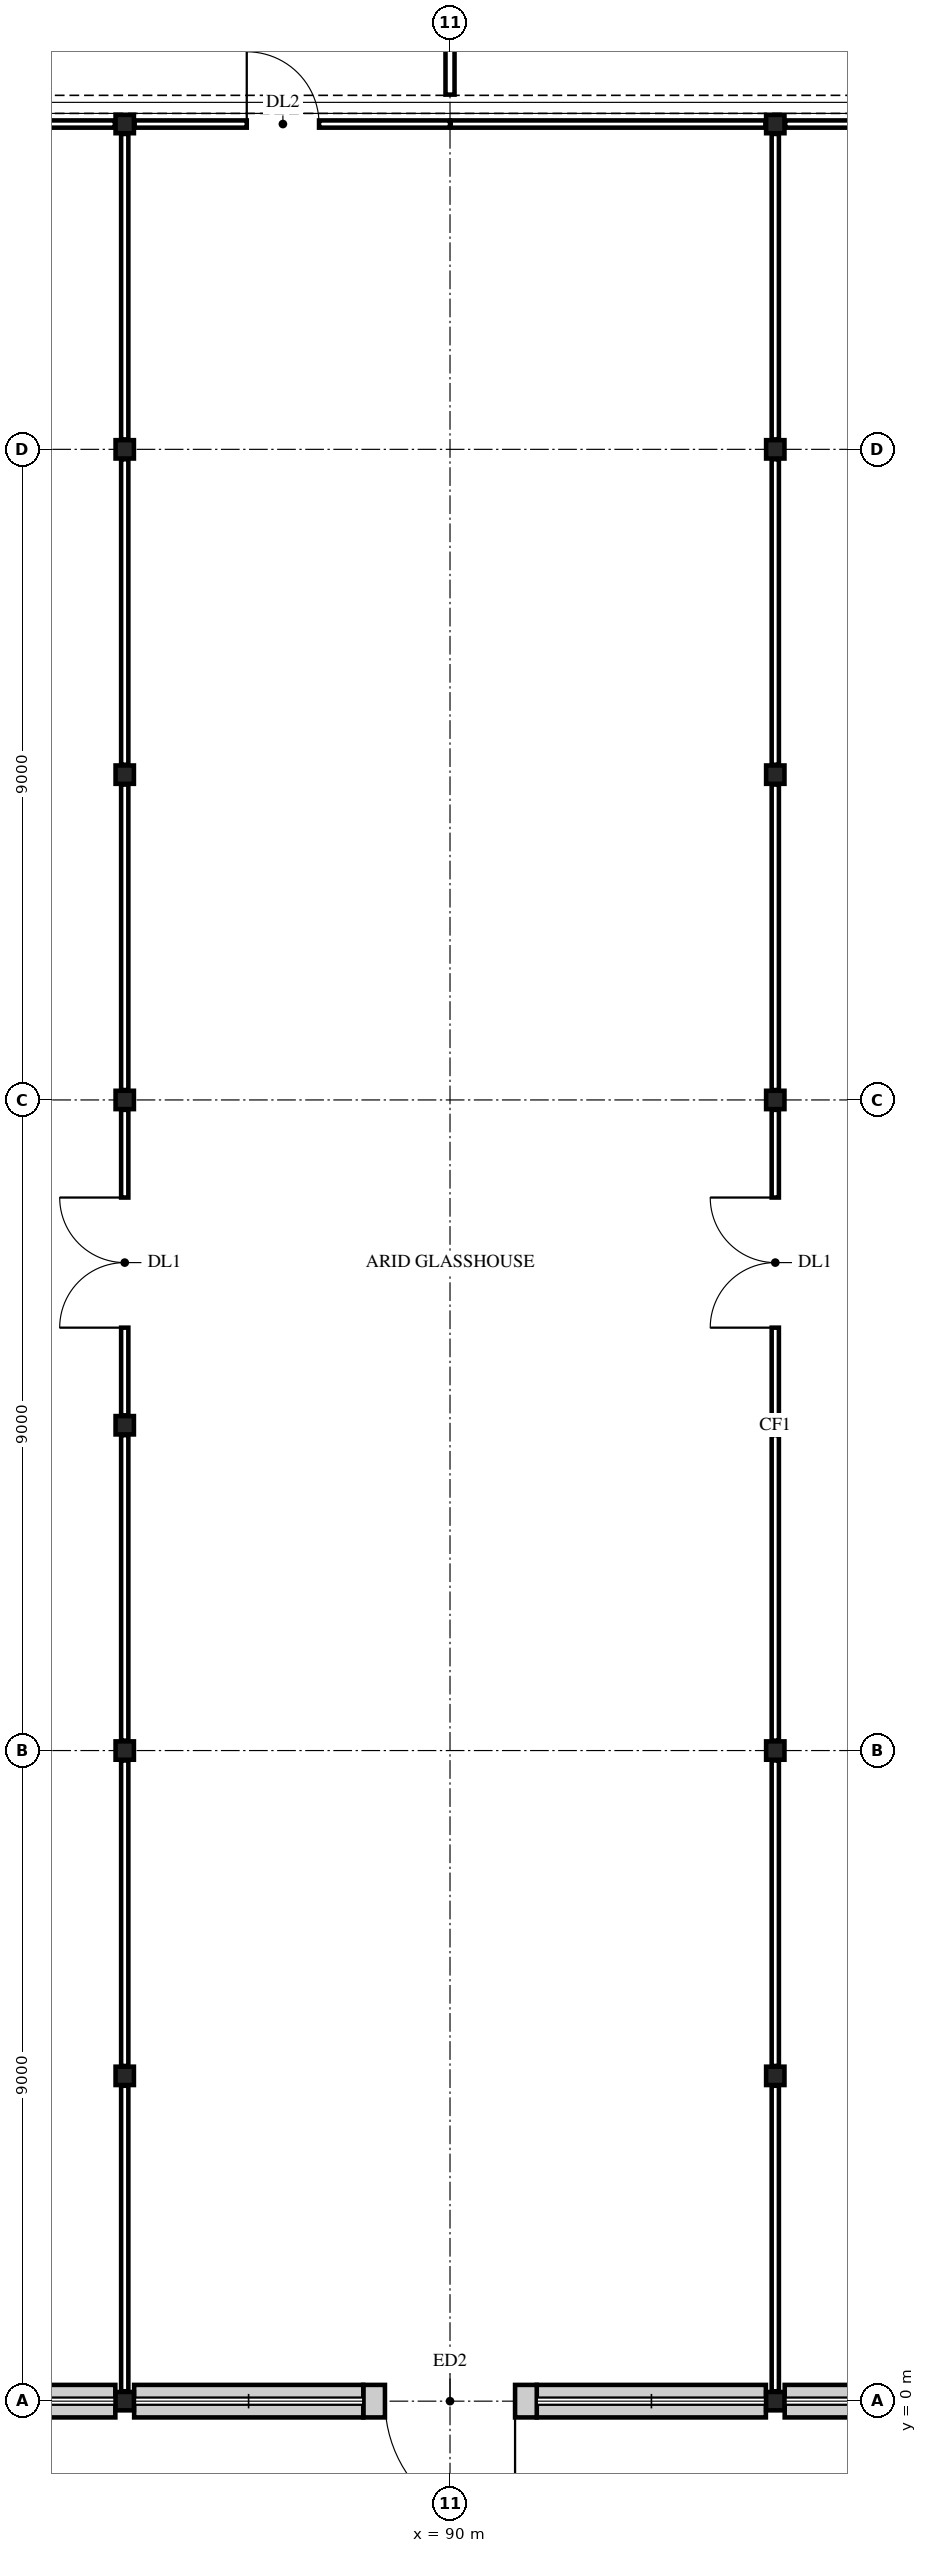
"""IFC4 building model, lengths in metres.
Left out: names, types, materials, properties, quantities, classifications, styles, units other than length and angle.
Written with IfcOpenShell. Run it as: python <this file> out.ifc"""

import sys

from ifc_helpers import new_model, si_unit, direction, frame, frame_2d, origin, origin_2d, place, context, subcontext, project, spatial, rectangle, i_section, extrude, element, fill, save


model = new_model("IFC4")
c1 = context("Model", 3, precision=1e-05, world=origin(), true_north=direction((0.0, 1.0)))
c2 = subcontext(c1, "Body", "Model", "MODEL_VIEW")
j1 = project(units=[si_unit("LENGTHUNIT", "METRE"), si_unit("PLANEANGLEUNIT", "RADIAN")], contexts=[c1])
p1 = place(None, origin())
s1 = spatial("IfcSite", under=j1, at=p1, CompositionType="ELEMENT")
p2 = place(p1, origin())
s2 = spatial("IfcBuilding", under=s1, at=p2, CompositionType="ELEMENT")
p3 = place(p2, origin())
s3 = spatial("IfcBuildingStorey", under=s2, at=p3, CompositionType="ELEMENT", Elevation=0.0)
for number, where, z_axis, x_axis in (
    (1, (85.5, 0.0, -0.2), (0.0, 0.0, 1.0), (1.0, 0.0, 0.0)),
    (2, (85.5, 4.5, -0.2), (0.0, 0.0, 1.0), (1.0, 0.0, 0.0)),
    (3, (85.5, 9.0, -0.2), (0.0, 0.0, 1.0), (1.0, 0.0, 0.0)),
    (4, (85.5, 13.5, -0.2), (0.0, 0.0, 1.0), (1.0, 0.0, 0.0)),
    (5, (85.5, 18.0, -0.2), (0.0, 0.0, 1.0), (1.0, 0.0, 0.0)),
    (6, (85.5, 22.5, -0.2), (0.0, 0.0, 1.0), (1.0, 0.0, 0.0)),
    (7, (85.5, 27.0, -0.2), (0.0, 0.0, 1.0), (1.0, 0.0, 0.0)),
    (8, (85.5, 31.5, -0.2), (0.0, 0.0, 1.0), (1.0, 0.0, 0.0)),
    (9, (94.5, 0.0, -0.2), (0.0, 0.0, 1.0), (1.0, 0.0, 0.0)),
    (10, (94.5, 4.5, -0.2), (0.0, 0.0, 1.0), (1.0, 0.0, 0.0)),
    (11, (94.5, 9.0, -0.2), (0.0, 0.0, 1.0), (1.0, 0.0, 0.0)),
    (12, (94.5, 13.5, -0.2), (0.0, 0.0, 1.0), (1.0, 0.0, 0.0)),
    (13, (94.5, 18.0, -0.2), (0.0, 0.0, 1.0), (1.0, 0.0, 0.0)),
    (14, (94.5, 22.5, -0.2), (0.0, 0.0, 1.0), (1.0, 0.0, 0.0)),
    (15, (94.5, 27.0, -0.2), (0.0, 0.0, 1.0), (1.0, 0.0, 0.0)),
    (16, (94.5, 31.5, -0.2), (0.0, 0.0, 1.0), (1.0, 0.0, 0.0)),
):
    element("IfcColumn", number, at=place(p3, frame(where, z_axis=z_axis, x_axis=x_axis)), inside=s3, PredefinedType="COLUMN", context=c2, shape_type="SweptSolid", body=[
        extrude(i_section(OverallWidth=0.254, OverallDepth=0.254, WebThickness=0.009, FlangeThickness=0.014, FilletRadius=0.014, at=origin_2d()), origin(), (0.0, 0.0, 1.0), 5.2),
    ])
for number, where, z_axis, x_axis in (
    (17, (85.37, 0.0, 0.0), (0.0, 0.0, 1.0), (-1.0, 0.0, 0.0)),
    (18, (94.37, 0.0, 0.0), (0.0, 0.0, 1.0), (-1.0, 0.0, 0.0)),
):
    element("IfcWall", number, at=place(p3, frame(where, z_axis=z_axis, x_axis=x_axis)), inside=s3, PredefinedType="STANDARD", context=c2, shape_type="SweptSolid", body=[
        extrude(rectangle(XDim=3.17, YDim=0.45, at=frame_2d((1.585, 0.0))), origin(), (0.0, 0.0, 1.0), 0.9),
    ])
p4 = place(p3, frame((91.2, 0.0, 0.0), z_axis=(0.0, 0.0, 1.0), x_axis=(-1.0, 0.0, 0.0)))
e19 = element("IfcWall", 19, at=p4, inside=s3, PredefinedType="STANDARD", context=c2, shape_type="SweptSolid", body=[
    extrude(rectangle(XDim=2.4, YDim=0.45, at=frame_2d((1.2, 0.0))), origin(), (0.0, 0.0, 1.0), 4.6),
])
p5 = place(p4, frame((0.3, 0.0, 0.012)))
e20 = element("IfcOpeningElement", 20, at=p5, cuts=e19, PredefinedType="OPENING", context=c2, shape_type="SweptSolid", body=[
    extrude(rectangle(XDim=1.8, YDim=2.4, at=frame_2d((0.9, 1.2))), frame((0.0, 0.235, 0.0), z_axis=(0.0, -1.0, 0.0), x_axis=(1.0, 0.0, 0.0)), (0.0, 0.0, 1.0), 0.47),
])
for number, where, z_axis, x_axis in (
    (21, (88.8, 0.0, 0.0), (0.0, 0.0, 1.0), (-1.0, 0.0, 0.0)),
    (22, (97.8, 0.0, 0.0), (0.0, 0.0, 1.0), (-1.0, 0.0, 0.0)),
):
    element("IfcWall", number, at=place(p3, frame(where, z_axis=z_axis, x_axis=x_axis)), inside=s3, PredefinedType="STANDARD", context=c2, shape_type="SweptSolid", body=[
        extrude(rectangle(XDim=3.17, YDim=0.45, at=frame_2d((1.585, 0.0))), origin(), (0.0, 0.0, 1.0), 0.9),
    ])
p6 = place(p3, frame((103.5, 31.772, 4.5), z_axis=(0.0, 0.0, 1.0), x_axis=(-1.0, 0.0, 0.0)))
e23 = element("IfcWall", 23, at=p6, inside=s3, PredefinedType="PARAPET", context=c2, shape_type="SweptSolid", body=[
    extrude(rectangle(XDim=27.0, YDim=0.25, at=frame_2d((13.5, 0.0))), origin(), (0.0, 0.0, 1.0), 1.1),
])
for number, where, z_axis, x_axis in (
    (24, (85.5, 0.137, 0.0), (0.0, 0.0, 1.0), (0.0, 1.0, 0.0)),
    (25, (85.5, 4.637, 0.0), (0.0, 0.0, 1.0), (0.0, 1.0, 0.0)),
    (26, (85.5, 9.137, 0.0), (0.0, 0.0, 1.0), (0.0, 1.0, 0.0)),
):
    element("IfcWall", number, at=place(p3, frame(where, z_axis=z_axis, x_axis=x_axis)), inside=s3, PredefinedType="PARTITIONING", context=c2, shape_type="SweptSolid", body=[
        extrude(rectangle(XDim=4.226, YDim=0.1, at=frame_2d((2.113, 0.0))), origin(), (0.0, 0.0, 1.0), 5.0),
    ])
p7 = place(p3, frame((85.5, 13.637, 0.0), z_axis=(0.0, 0.0, 1.0), x_axis=(0.0, 1.0, 0.0)))
e27 = element("IfcWall", 27, at=p7, inside=s3, PredefinedType="PARTITIONING", context=c2, shape_type="SweptSolid", body=[
    extrude(rectangle(XDim=4.226, YDim=0.1, at=frame_2d((2.113, 0.0))), origin(), (0.0, 0.0, 1.0), 5.0),
])
p8 = place(p7, frame((1.213, 0.0, 0.0)))
e28 = element("IfcOpeningElement", 28, at=p8, cuts=e27, PredefinedType="OPENING", context=c2, shape_type="SweptSolid", body=[
    extrude(rectangle(XDim=1.8, YDim=2.1, at=frame_2d((0.9, 1.05))), frame((0.0, 0.06, 0.0), z_axis=(0.0, -1.0, 0.0), x_axis=(1.0, 0.0, 0.0)), (0.0, 0.0, 1.0), 0.12),
])
for number, where, z_axis, x_axis in (
    (29, (85.5, 18.137, 0.0), (0.0, 0.0, 1.0), (0.0, 1.0, 0.0)),
    (30, (85.5, 22.637, 0.0), (0.0, 0.0, 1.0), (0.0, 1.0, 0.0)),
    (31, (85.5, 27.137, 0.0), (0.0, 0.0, 1.0), (0.0, 1.0, 0.0)),
):
    element("IfcWall", number, at=place(p3, frame(where, z_axis=z_axis, x_axis=x_axis)), inside=s3, PredefinedType="PARTITIONING", context=c2, shape_type="SweptSolid", body=[
        extrude(rectangle(XDim=4.226, YDim=0.1, at=frame_2d((2.113, 0.0))), origin(), (0.0, 0.0, 1.0), 5.0),
    ])
p9 = place(p3, frame((90.0, 31.907, 0.0), z_axis=(0.0, 0.0, 1.0), x_axis=(0.0, 1.0, 0.0)))
e32 = element("IfcWall", 32, at=p9, inside=s3, PredefinedType="PARTITIONING", context=c2, shape_type="SweptSolid", body=[
    extrude(rectangle(XDim=3.472, YDim=0.125, at=frame_2d((1.736, 0.0))), origin(), (0.0, 0.0, 1.0), 4.098),
])
p10 = place(p9, frame((1.281, 0.0, 0.0)))
e33 = element("IfcOpeningElement", 33, at=p10, cuts=e32, PredefinedType="OPENING", context=c2, shape_type="SweptSolid", body=[
    extrude(rectangle(XDim=1.0, YDim=2.1, at=frame_2d((0.5, 1.05))), frame((0.0, 0.073, 0.0), z_axis=(0.0, -1.0, 0.0), x_axis=(1.0, 0.0, 0.0)), (0.0, 0.0, 1.0), 0.145),
])
for number, where, z_axis, x_axis in (
    (34, (94.5, 0.137, 0.0), (0.0, 0.0, 1.0), (0.0, 1.0, 0.0)),
    (35, (94.5, 4.637, 0.0), (0.0, 0.0, 1.0), (0.0, 1.0, 0.0)),
    (36, (94.5, 9.137, 0.0), (0.0, 0.0, 1.0), (0.0, 1.0, 0.0)),
):
    element("IfcWall", number, at=place(p3, frame(where, z_axis=z_axis, x_axis=x_axis)), inside=s3, PredefinedType="PARTITIONING", context=c2, shape_type="SweptSolid", body=[
        extrude(rectangle(XDim=4.226, YDim=0.1, at=frame_2d((2.113, 0.0))), origin(), (0.0, 0.0, 1.0), 5.0),
    ])
p11 = place(p3, frame((94.5, 13.637, 0.0), z_axis=(0.0, 0.0, 1.0), x_axis=(0.0, 1.0, 0.0)))
e37 = element("IfcWall", 37, at=p11, inside=s3, PredefinedType="PARTITIONING", context=c2, shape_type="SweptSolid", body=[
    extrude(rectangle(XDim=4.226, YDim=0.1, at=frame_2d((2.113, 0.0))), origin(), (0.0, 0.0, 1.0), 5.0),
])
p12 = place(p11, frame((1.213, 0.0, 0.0)))
e38 = element("IfcOpeningElement", 38, at=p12, cuts=e37, PredefinedType="OPENING", context=c2, shape_type="SweptSolid", body=[
    extrude(rectangle(XDim=1.8, YDim=2.1, at=frame_2d((0.9, 1.05))), frame((0.0, 0.06, 0.0), z_axis=(0.0, -1.0, 0.0), x_axis=(1.0, 0.0, 0.0)), (0.0, 0.0, 1.0), 0.12),
])
for number, where, z_axis, x_axis in (
    (39, (94.5, 18.137, 0.0), (0.0, 0.0, 1.0), (0.0, 1.0, 0.0)),
    (40, (94.5, 22.637, 0.0), (0.0, 0.0, 1.0), (0.0, 1.0, 0.0)),
    (41, (94.5, 27.137, 0.0), (0.0, 0.0, 1.0), (0.0, 1.0, 0.0)),
):
    element("IfcWall", number, at=place(p3, frame(where, z_axis=z_axis, x_axis=x_axis)), inside=s3, PredefinedType="PARTITIONING", context=c2, shape_type="SweptSolid", body=[
        extrude(rectangle(XDim=4.226, YDim=0.1, at=frame_2d((2.113, 0.0))), origin(), (0.0, 0.0, 1.0), 5.0),
    ])
p13 = place(p3, frame((80.0, 31.5, 0.0), z_axis=(0.0, 0.0, 1.0), x_axis=(1.0, 0.0, 0.0)))
e42 = element("IfcWall", 42, at=p13, inside=s3, PredefinedType="PARTITIONING", context=c2, shape_type="SweptSolid", body=[
    extrude(rectangle(XDim=5.363, YDim=0.1, at=frame_2d((2.682, 0.0))), origin(), (0.0, 0.0, 1.0), 4.046),
])
p14 = place(p3, frame((85.637, 31.5, 0.0), z_axis=(0.0, 0.0, 1.0), x_axis=(1.0, 0.0, 0.0)))
e43 = element("IfcWall", 43, at=p14, inside=s3, PredefinedType="PARTITIONING", context=c2, shape_type="SweptSolid", body=[
    extrude(rectangle(XDim=4.363, YDim=0.1, at=frame_2d((2.182, 0.0))), origin(), (0.0, 0.0, 1.0), 4.046),
])
p15 = place(p14, frame((1.551, 0.0, 0.0)))
e44 = element("IfcOpeningElement", 44, at=p15, cuts=e43, PredefinedType="OPENING", context=c2, shape_type="SweptSolid", body=[
    extrude(rectangle(XDim=1.0, YDim=2.1, at=frame_2d((0.5, 1.05))), frame((0.0, 0.06, 0.0), z_axis=(0.0, -1.0, 0.0), x_axis=(1.0, 0.0, 0.0)), (0.0, 0.0, 1.0), 0.12),
])
p16 = place(p3, frame((90.01, 31.5, 0.0), z_axis=(0.0, 0.0, 1.0), x_axis=(1.0, 0.0, 0.0)))
e45 = element("IfcWall", 45, at=p16, inside=s3, PredefinedType="PARTITIONING", context=c2, shape_type="SweptSolid", body=[
    extrude(rectangle(XDim=4.353, YDim=0.1, at=frame_2d((2.177, 0.0))), origin(), (0.0, 0.0, 1.0), 4.046),
])
p17 = place(p3, frame((94.637, 31.5, 0.0), z_axis=(0.0, 0.0, 1.0), x_axis=(1.0, 0.0, 0.0)))
e46 = element("IfcWall", 46, at=p17, inside=s3, PredefinedType="PARTITIONING", context=c2, shape_type="SweptSolid", body=[
    extrude(rectangle(XDim=8.726, YDim=0.1, at=frame_2d((4.363, 0.0))), origin(), (0.0, 0.0, 1.0), 4.046),
])
p18 = place(p17, frame((3.463, 0.0, 0.0)))
e47 = element("IfcOpeningElement", 47, at=p18, cuts=e46, PredefinedType="OPENING", context=c2, shape_type="SweptSolid", body=[
    extrude(rectangle(XDim=1.8, YDim=2.1, at=frame_2d((0.9, 1.05))), frame((0.0, 0.06, 0.0), z_axis=(0.0, -1.0, 0.0), x_axis=(1.0, 0.0, 0.0)), (0.0, 0.0, 1.0), 0.12),
])
p19 = place(p5, origin())
e48 = element("IfcDoor", 48, at=p19, inside=s3, OperationType="DOUBLE_DOOR_DOUBLE_SWING", PredefinedType="DOOR", context=c2, shape_type="SweptSolid", body=[
    extrude(rectangle(XDim=1.8, YDim=2.4, at=frame_2d((0.9, 1.2))), frame((0.0, 0.025, 0.0), z_axis=(0.0, -1.0, 0.0), x_axis=(1.0, 0.0, 0.0)), (0.0, 0.0, 1.0), 0.05),
])
fill(e20, e48)
p20 = place(p8, frame((1.8, 0.0, 0.0), z_axis=(0.0, 0.0, 1.0), x_axis=(-1.0, 0.0, 0.0)))
e49 = element("IfcDoor", 49, at=p20, inside=s3, OperationType="DOUBLE_DOOR_SINGLE_SWING", PredefinedType="DOOR", context=c2, shape_type="SweptSolid", body=[
    extrude(rectangle(XDim=1.8, YDim=2.1, at=frame_2d((0.9, 1.05))), frame((0.0, 0.025, 0.0), z_axis=(0.0, -1.0, 0.0), x_axis=(1.0, 0.0, 0.0)), (0.0, 0.0, 1.0), 0.05),
])
fill(e28, e49)
p21 = place(p12, frame((1.8, 0.0, 0.0), z_axis=(0.0, 0.0, 1.0), x_axis=(-1.0, 0.0, 0.0)))
e50 = element("IfcDoor", 50, at=p21, inside=s3, OperationType="DOUBLE_DOOR_SINGLE_SWING", PredefinedType="DOOR", context=c2, shape_type="SweptSolid", body=[
    extrude(rectangle(XDim=1.8, YDim=2.1, at=frame_2d((0.9, 1.05))), frame((0.0, 0.025, 0.0), z_axis=(0.0, -1.0, 0.0), x_axis=(1.0, 0.0, 0.0)), (0.0, 0.0, 1.0), 0.05),
])
fill(e38, e50)
p22 = place(p15, origin())
e51 = element("IfcDoor", 51, at=p22, inside=s3, OperationType="SINGLE_SWING_LEFT", PredefinedType="DOOR", context=c2, shape_type="SweptSolid", body=[
    extrude(rectangle(XDim=1.0, YDim=2.1, at=frame_2d((0.5, 1.05))), frame((0.0, 0.025, 0.0), z_axis=(0.0, -1.0, 0.0), x_axis=(1.0, 0.0, 0.0)), (0.0, 0.0, 1.0), 0.05),
])
fill(e44, e51)
save(model, sys.argv[1])
